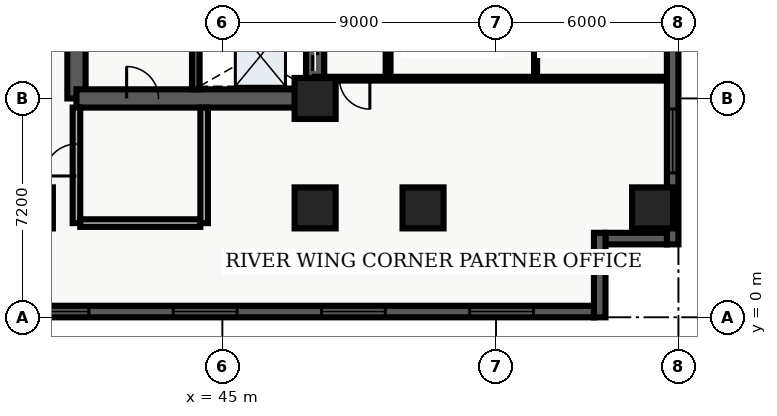
"""IFC4 building model, lengths in metres.
Left out: names, types, materials, properties, quantities, classifications, styles, units other than length and angle.
Written with IfcOpenShell. Run it as: python <this file> out.ifc"""

import sys

from ifc_helpers import new_model, entity, si_unit, converted_unit, direction, frame, origin_with_axes, origin_2d_with_axis, place, context, subcontext, project, spatial, polyline, rectangle, outline, extrude, element, fill, save


model = new_model("IFC4")
c1 = context("Model", 3, precision=1e-05, world=origin_with_axes(), true_north=direction((0.0, 1.0)))
c2 = subcontext(c1, "Body", "Model", "MODEL_VIEW")
j1 = project(units=[si_unit("LENGTHUNIT", "METRE"), converted_unit("PLANEANGLEUNIT", "DEGREE", entity("IfcPlaneAngleMeasure", 0.017), si_unit("PLANEANGLEUNIT", "RADIAN"), dimensions=[0, 0, 0, 0, 0, 0, 0])], contexts=[c1])
p1 = place(None, origin_with_axes())
s1 = spatial("IfcSite", under=j1, at=p1, CompositionType="ELEMENT")
p2 = place(p1, origin_with_axes())
s2 = spatial("IfcBuilding", under=s1, at=p2, CompositionType="ELEMENT")
p3 = place(p2, frame((0.0, 0.0, 67.8), z_axis=(0.0, 0.0, 1.0), x_axis=(1.0, 0.0, 0.0)))
s3 = spatial("IfcBuildingStorey", under=s2, at=p3, CompositionType="ELEMENT", Elevation=67.8)
p4 = place(p3, frame((40.2, 7.2, 0.0), z_axis=(0.0, 0.0, 1.0), x_axis=(0.0, 1.0, 0.0)))
e1 = element("IfcWall", 1, at=p4, inside=s3, PredefinedType="SHEAR", context=c2, shape_type="SweptSolid", body=[
    extrude(outline(polyline([(0.0, -0.3), (15.6, -0.3), (15.6, 0.3), (0.0, 0.3), (0.0, -0.3)])), origin_with_axes(), (0.0, 0.0, 1.0), 3.66),
])
p5 = place(p4, frame((12.75, 0.0, 0.0), z_axis=(0.0, 0.0, 1.0), x_axis=(1.0, 0.0, 0.0)))
e2 = element("IfcOpeningElement", 2, at=p5, cuts=e1, PredefinedType="OPENING", context=c2, shape_type="SweptSolid", body=[
    extrude(rectangle(XDim=1.2, YDim=0.62, at=origin_2d_with_axis()), origin_with_axes(), (0.0, 0.0, 1.0), 2.15),
])
p6 = place(p4, frame((9.3, 0.0, 0.0), z_axis=(0.0, 0.0, 1.0), x_axis=(1.0, 0.0, 0.0)))
e3 = element("IfcOpeningElement", 3, at=p6, cuts=e1, PredefinedType="OPENING", context=c2, shape_type="SweptSolid", body=[
    extrude(rectangle(XDim=0.9, YDim=0.62, at=origin_2d_with_axis()), origin_with_axes(), (0.0, 0.0, 1.0), 2.15),
])
p7 = place(p3, frame((40.2, 7.2, 0.0), z_axis=(0.0, 0.0, 1.0), x_axis=(1.0, 0.0, 0.0)))
e4 = element("IfcWall", 4, at=p7, inside=s3, PredefinedType="SHEAR", context=c2, shape_type="SweptSolid", body=[
    extrude(outline(polyline([(0.0, -0.3), (7.85, -0.3), (7.85, 0.3), (0.0, 0.3), (0.0, -0.3)])), origin_with_axes(), (0.0, 0.0, 1.0), 3.66),
])
p8 = place(p7, frame((2.175, 0.0, 0.0), z_axis=(0.0, 0.0, 1.0), x_axis=(1.0, 0.0, 0.0)))
e5 = element("IfcOpeningElement", 5, at=p8, cuts=e4, PredefinedType="OPENING", context=c2, shape_type="SweptSolid", body=[
    extrude(rectangle(XDim=1.05, YDim=0.62, at=origin_2d_with_axis()), origin_with_axes(), (0.0, 0.0, 1.0), 2.15),
])
p9 = place(p3, frame((48.05, 7.2, 0.0), z_axis=(0.0, 0.0, 1.0), x_axis=(0.0, 1.0, 0.0)))
e6 = element("IfcWall", 6, at=p9, inside=s3, PredefinedType="SHEAR", context=c2, shape_type="SweptSolid", body=[
    extrude(outline(polyline([(0.0, -0.3), (15.6, -0.3), (15.6, 0.3), (0.0, 0.3), (0.0, -0.3)])), origin_with_axes(), (0.0, 0.0, 1.0), 3.66),
])
p10 = place(p9, frame((1.425, 0.0, 0.0), z_axis=(0.0, 0.0, 1.0), x_axis=(1.0, 0.0, 0.0)))
e7 = element("IfcOpeningElement", 7, at=p10, cuts=e6, PredefinedType="OPENING", context=c2, shape_type="SweptSolid", body=[
    extrude(rectangle(XDim=1.05, YDim=0.62, at=origin_2d_with_axis()), origin_with_axes(), (0.0, 0.0, 1.0), 2.15),
])
p11 = place(p9, frame((3.475, 0.0, 0.0), z_axis=(0.0, 0.0, 1.0), x_axis=(1.0, 0.0, 0.0)))
e8 = element("IfcOpeningElement", 8, at=p11, cuts=e6, PredefinedType="OPENING", context=c2, shape_type="SweptSolid", body=[
    extrude(rectangle(XDim=1.05, YDim=0.62, at=origin_2d_with_axis()), origin_with_axes(), (0.0, 0.0, 1.0), 2.15),
])
p12 = place(p9, frame((5.625, 0.0, 0.0), z_axis=(0.0, 0.0, 1.0), x_axis=(1.0, 0.0, 0.0)))
e9 = element("IfcOpeningElement", 9, at=p12, cuts=e6, PredefinedType="OPENING", context=c2, shape_type="SweptSolid", body=[
    extrude(rectangle(XDim=0.95, YDim=0.62, at=origin_2d_with_axis()), origin_with_axes(), (0.0, 0.0, 1.0), 2.15),
])
p13 = place(p3, frame((44.125, 7.5, 0.0), z_axis=(0.0, 0.0, 1.0), x_axis=(0.0, 1.0, 0.0)))
e10 = element("IfcWall", 10, at=p13, inside=s3, PredefinedType="SHEAR", context=c2, shape_type="SweptSolid", body=[
    extrude(outline(polyline([(0.0, -0.125), (15.0, -0.125), (15.0, 0.125), (0.0, 0.125), (0.0, -0.125)])), origin_with_axes(), (0.0, 0.0, 1.0), 3.66),
])
p14 = place(p3, frame((40.2, 3.1, 0.0), z_axis=(0.0, 0.0, 1.0), x_axis=(0.0, 1.0, 0.0)))
e11 = element("IfcWall", 11, at=p14, inside=s3, PredefinedType="SOLIDWALL", context=c2, shape_type="SweptSolid", body=[
    extrude(outline(polyline([(0.0, -0.125), (3.8, -0.125), (3.8, 0.125), (0.0, 0.125), (0.0, -0.125)])), origin_with_axes(), (0.0, 0.0, 1.0), 2.7),
])
p15 = place(p14, frame((2.075, 0.0, 0.0), z_axis=(0.0, 0.0, 1.0), x_axis=(1.0, 0.0, 0.0)))
e12 = element("IfcOpeningElement", 12, at=p15, cuts=e11, PredefinedType="OPENING", context=c2, shape_type="SweptSolid", body=[
    extrude(rectangle(XDim=1.05, YDim=0.27, at=origin_2d_with_axis()), origin_with_axes(), (0.0, 0.0, 1.0), 2.15),
])
p16 = place(p3, frame((40.325, 3.1, 0.0), z_axis=(0.0, 0.0, 1.0), x_axis=(1.0, 0.0, 0.0)))
e13 = element("IfcWall", 13, at=p16, inside=s3, PredefinedType="SOLIDWALL", context=c2, shape_type="SweptSolid", body=[
    extrude(outline(polyline([(0.0, -0.125), (3.95, -0.125), (3.95, 0.125), (0.0, 0.125), (0.0, -0.125)])), origin_with_axes(), (0.0, 0.0, 1.0), 2.7),
])
p17 = place(p3, frame((44.4, 3.1, 0.0), z_axis=(0.0, 0.0, 1.0), x_axis=(0.0, 1.0, 0.0)))
e14 = element("IfcWall", 14, at=p17, inside=s3, PredefinedType="SOLIDWALL", context=c2, shape_type="SweptSolid", body=[
    extrude(outline(polyline([(0.0, -0.125), (3.8, -0.125), (3.8, 0.125), (0.0, 0.125), (0.0, -0.125)])), origin_with_axes(), (0.0, 0.0, 1.0), 2.7),
])
for number, where, z_axis, x_axis in (
    (15, (38.75, 3.6, 0.0), (0.0, 0.0, 1.0), (1.0, 0.0, 0.0)),
    (16, (48.05, 3.6, 0.0), (0.0, 0.0, 1.0), (1.0, 0.0, 0.0)),
    (17, (48.05, 7.2, 0.0), (0.0, 0.0, 1.0), (1.0, 0.0, 0.0)),
    (18, (51.6, 3.6, 0.0), (0.0, 0.0, 1.0), (1.0, 0.0, 0.0)),
    (19, (59.15, 3.6, 0.0), (0.0, 0.0, 1.0), (1.0, 0.0, 0.0)),
):
    element("IfcColumn", number, at=place(p3, frame(where, z_axis=z_axis, x_axis=x_axis)), inside=s3, PredefinedType="COLUMN", context=c2, shape_type="SweptSolid", body=[
        extrude(rectangle(XDim=1.35, YDim=1.35, at=origin_2d_with_axis()), origin_with_axes(), (0.0, 0.0, 1.0), 3.9),
    ])
p18 = place(p3, frame((50.45, 7.85, 0.0), z_axis=(0.0, 0.0, 1.0), x_axis=(0.0, 1.0, 0.0)))
e20 = element("IfcWall", 20, at=p18, inside=s3, PredefinedType="PARTITIONING", context=c2, shape_type="SweptSolid", body=[
    extrude(outline(polyline([(0.0, -0.08), (18.8, -0.08), (18.8, 0.08), (0.0, 0.08), (0.0, -0.08)])), origin_with_axes(), (0.0, 0.0, 1.0), 2.7),
])
p19 = place(p18, frame((4.405, 0.0, 0.0), z_axis=(0.0, 0.0, 1.0), x_axis=(1.0, 0.0, 0.0)))
e21 = element("IfcOpeningElement", 21, at=p19, cuts=e20, PredefinedType="OPENING", context=c2, shape_type="SweptSolid", body=[
    extrude(rectangle(XDim=1.0, YDim=0.18, at=origin_2d_with_axis()), origin_with_axes(), (0.0, 0.0, 1.0), 2.15),
])
p20 = place(p18, frame((13.465, 0.0, 0.0), z_axis=(0.0, 0.0, 1.0), x_axis=(1.0, 0.0, 0.0)))
e22 = element("IfcOpeningElement", 22, at=p20, cuts=e20, PredefinedType="OPENING", context=c2, shape_type="SweptSolid", body=[
    extrude(rectangle(XDim=1.0, YDim=0.18, at=origin_2d_with_axis()), origin_with_axes(), (0.0, 0.0, 1.0), 2.15),
])
p21 = place(p3, frame((59.64, 7.85, 0.0), z_axis=(0.0, 0.0, 1.0), x_axis=(-1.0, 0.0, 0.0)))
e23 = element("IfcWall", 23, at=p21, inside=s3, PredefinedType="PARTITIONING", context=c2, shape_type="SweptSolid", body=[
    extrude(outline(polyline([(0.0, -0.062), (11.59, -0.062), (11.59, 0.062), (0.0, 0.062), (0.0, -0.062)])), origin_with_axes(), (0.0, 0.0, 1.0), 2.7),
])
p22 = place(p21, frame((10.29, 0.0, 0.0), z_axis=(0.0, 0.0, 1.0), x_axis=(1.0, 0.0, 0.0)))
e24 = element("IfcOpeningElement", 24, at=p22, cuts=e23, PredefinedType="OPENING", context=c2, shape_type="SweptSolid", body=[
    extrude(rectangle(XDim=1.0, YDim=0.145, at=origin_2d_with_axis()), origin_with_axes(), (0.0, 0.0, 1.0), 2.15),
])
p23 = place(p3, frame((55.3, 7.98, 0.0), z_axis=(0.0, 0.0, 1.0), x_axis=(0.0, 1.0, 0.0)))
e25 = element("IfcWall", 25, at=p23, inside=s3, PredefinedType="PARTITIONING", context=c2, shape_type="SweptSolid", body=[
    extrude(outline(polyline([(0.0, -0.05), (18.54, -0.05), (18.54, 0.05), (0.0, 0.05), (0.0, -0.05)])), origin_with_axes(), (0.0, 0.0, 1.0), 2.7),
])
p24 = place(p23, frame((3.995, 0.0, 0.0), z_axis=(0.0, 0.0, 1.0), x_axis=(1.0, 0.0, 0.0)))
e26 = element("IfcOpeningElement", 26, at=p24, cuts=e25, PredefinedType="OPENING", context=c2, shape_type="SweptSolid", body=[
    extrude(rectangle(XDim=0.95, YDim=0.12, at=origin_2d_with_axis()), origin_with_axes(), (0.0, 0.0, 1.0), 2.15),
])
p25 = place(p23, frame((13.335, 0.0, 0.0), z_axis=(0.0, 0.0, 1.0), x_axis=(1.0, 0.0, 0.0)))
e27 = element("IfcOpeningElement", 27, at=p25, cuts=e25, PredefinedType="OPENING", context=c2, shape_type="SweptSolid", body=[
    extrude(rectangle(XDim=0.95, YDim=0.12, at=origin_2d_with_axis()), origin_with_axes(), (0.0, 0.0, 1.0), 2.15),
])
p26 = place(p3, frame((59.81, 26.02, 0.0), z_axis=(0.0, 0.0, 1.0), x_axis=(0.0, -1.0, 0.0)))
e28 = element("IfcWall", 28, at=p26, inside=s3, PredefinedType="SOLIDWALL", context=c2, shape_type="SweptSolid", body=[
    extrude(outline(polyline([(0.0, -0.19), (23.62, -0.19), (23.62, 0.19), (0.0, 0.19), (0.0, -0.19)])), origin_with_axes(), (0.0, 0.0, 1.0), 3.66),
])
p27 = place(p26, frame((3.853, 0.0, 0.45), z_axis=(0.0, 0.0, 1.0), x_axis=(1.0, 0.0, 0.0)))
e29 = element("IfcOpeningElement", 29, at=p27, cuts=e28, PredefinedType="OPENING", context=c2, shape_type="SweptSolid", body=[
    extrude(rectangle(XDim=2.1, YDim=0.4, at=origin_2d_with_axis()), origin_with_axes(), (0.0, 0.0, 1.0), 2.2),
])
p28 = place(p26, frame((20.218, 0.0, 0.45), z_axis=(0.0, 0.0, 1.0), x_axis=(1.0, 0.0, 0.0)))
e30 = element("IfcOpeningElement", 30, at=p28, cuts=e28, PredefinedType="OPENING", context=c2, shape_type="SweptSolid", body=[
    extrude(rectangle(XDim=2.1, YDim=0.4, at=origin_2d_with_axis()), origin_with_axes(), (0.0, 0.0, 1.0), 2.2),
])
p29 = place(p3, frame((59.62, 2.59, 0.0), z_axis=(0.0, 0.0, 1.0), x_axis=(-1.0, 0.0, 0.0)))
e31 = element("IfcWall", 31, at=p29, inside=s3, PredefinedType="SOLIDWALL", context=c2, shape_type="SweptSolid", body=[
    extrude(outline(polyline([(0.0, -0.19), (2.02, -0.19), (2.02, 0.19), (0.0, 0.19), (0.0, -0.19)])), origin_with_axes(), (0.0, 0.0, 1.0), 3.66),
])
p30 = place(p3, frame((57.41, 2.78, 0.0), z_axis=(0.0, 0.0, 1.0), x_axis=(0.0, -1.0, 0.0)))
e32 = element("IfcWall", 32, at=p30, inside=s3, PredefinedType="SOLIDWALL", context=c2, shape_type="SweptSolid", body=[
    extrude(outline(polyline([(0.0, -0.19), (2.78, -0.19), (2.78, 0.19), (0.0, 0.19), (0.0, -0.19)])), origin_with_axes(), (0.0, 0.0, 1.0), 3.66),
])
p31 = place(p3, frame((57.22, 0.19, 0.0), z_axis=(0.0, 0.0, 1.0), x_axis=(-1.0, 0.0, 0.0)))
e33 = element("IfcWall", 33, at=p31, inside=s3, PredefinedType="SOLIDWALL", context=c2, shape_type="SweptSolid", body=[
    extrude(outline(polyline([(0.0, -0.19), (54.82, -0.19), (54.82, 0.19), (0.0, 0.19), (0.0, -0.19)])), origin_with_axes(), (0.0, 0.0, 1.0), 3.66),
])
p32 = place(p31, frame((3.037, 0.0, 0.45), z_axis=(0.0, 0.0, 1.0), x_axis=(1.0, 0.0, 0.0)))
e34 = element("IfcOpeningElement", 34, at=p32, cuts=e33, PredefinedType="OPENING", context=c2, shape_type="SweptSolid", body=[
    extrude(rectangle(XDim=2.1, YDim=0.4, at=origin_2d_with_axis()), origin_with_axes(), (0.0, 0.0, 1.0), 2.2),
])
p33 = place(p31, frame((7.912, 0.0, 0.45), z_axis=(0.0, 0.0, 1.0), x_axis=(1.0, 0.0, 0.0)))
e35 = element("IfcOpeningElement", 35, at=p33, cuts=e33, PredefinedType="OPENING", context=c2, shape_type="SweptSolid", body=[
    extrude(rectangle(XDim=2.1, YDim=0.4, at=origin_2d_with_axis()), origin_with_axes(), (0.0, 0.0, 1.0), 2.2),
])
p34 = place(p31, frame((12.786, 0.0, 0.45), z_axis=(0.0, 0.0, 1.0), x_axis=(1.0, 0.0, 0.0)))
e36 = element("IfcOpeningElement", 36, at=p34, cuts=e33, PredefinedType="OPENING", context=c2, shape_type="SweptSolid", body=[
    extrude(rectangle(XDim=2.1, YDim=0.4, at=origin_2d_with_axis()), origin_with_axes(), (0.0, 0.0, 1.0), 2.2),
])
p35 = place(p31, frame((17.661, 0.0, 0.45), z_axis=(0.0, 0.0, 1.0), x_axis=(1.0, 0.0, 0.0)))
e37 = element("IfcOpeningElement", 37, at=p35, cuts=e33, PredefinedType="OPENING", context=c2, shape_type="SweptSolid", body=[
    extrude(rectangle(XDim=2.1, YDim=0.4, at=origin_2d_with_axis()), origin_with_axes(), (0.0, 0.0, 1.0), 2.2),
])
p36 = place(p31, frame((22.535, 0.0, 0.45), z_axis=(0.0, 0.0, 1.0), x_axis=(1.0, 0.0, 0.0)))
e38 = element("IfcOpeningElement", 38, at=p36, cuts=e33, PredefinedType="OPENING", context=c2, shape_type="SweptSolid", body=[
    extrude(rectangle(XDim=2.1, YDim=0.4, at=origin_2d_with_axis()), origin_with_axes(), (0.0, 0.0, 1.0), 2.2),
])
p37 = place(p31, frame((27.41, 0.0, 0.45), z_axis=(0.0, 0.0, 1.0), x_axis=(1.0, 0.0, 0.0)))
e39 = element("IfcOpeningElement", 39, at=p37, cuts=e33, PredefinedType="OPENING", context=c2, shape_type="SweptSolid", body=[
    extrude(rectangle(XDim=2.1, YDim=0.4, at=origin_2d_with_axis()), origin_with_axes(), (0.0, 0.0, 1.0), 2.2),
])
p38 = place(p31, frame((32.285, 0.0, 0.45), z_axis=(0.0, 0.0, 1.0), x_axis=(1.0, 0.0, 0.0)))
e40 = element("IfcOpeningElement", 40, at=p38, cuts=e33, PredefinedType="OPENING", context=c2, shape_type="SweptSolid", body=[
    extrude(rectangle(XDim=2.1, YDim=0.4, at=origin_2d_with_axis()), origin_with_axes(), (0.0, 0.0, 1.0), 2.2),
])
p39 = place(p31, frame((37.159, 0.0, 0.45), z_axis=(0.0, 0.0, 1.0), x_axis=(1.0, 0.0, 0.0)))
e41 = element("IfcOpeningElement", 41, at=p39, cuts=e33, PredefinedType="OPENING", context=c2, shape_type="SweptSolid", body=[
    extrude(rectangle(XDim=2.1, YDim=0.4, at=origin_2d_with_axis()), origin_with_axes(), (0.0, 0.0, 1.0), 2.2),
])
p40 = place(p31, frame((42.034, 0.0, 0.45), z_axis=(0.0, 0.0, 1.0), x_axis=(1.0, 0.0, 0.0)))
e42 = element("IfcOpeningElement", 42, at=p40, cuts=e33, PredefinedType="OPENING", context=c2, shape_type="SweptSolid", body=[
    extrude(rectangle(XDim=2.1, YDim=0.4, at=origin_2d_with_axis()), origin_with_axes(), (0.0, 0.0, 1.0), 2.2),
])
p41 = place(p31, frame((47.758, 0.0, 0.45), z_axis=(0.0, 0.0, 1.0), x_axis=(1.0, 0.0, 0.0)))
e43 = element("IfcOpeningElement", 43, at=p41, cuts=e33, PredefinedType="OPENING", context=c2, shape_type="SweptSolid", body=[
    extrude(rectangle(XDim=2.1, YDim=0.4, at=origin_2d_with_axis()), origin_with_axes(), (0.0, 0.0, 1.0), 2.2),
])
p42 = place(p31, frame((52.233, 0.0, 0.45), z_axis=(0.0, 0.0, 1.0), x_axis=(1.0, 0.0, 0.0)))
e44 = element("IfcOpeningElement", 44, at=p42, cuts=e33, PredefinedType="OPENING", context=c2, shape_type="SweptSolid", body=[
    extrude(rectangle(XDim=2.1, YDim=0.4, at=origin_2d_with_axis()), origin_with_axes(), (0.0, 0.0, 1.0), 2.2),
])
p43 = place(p9, frame((1.425, 0.0, 0.0), z_axis=(0.0, 0.0, 1.0), x_axis=(1.0, 0.0, 0.0)))
e45 = element("IfcDoor", 45, at=p43, inside=s3, OperationType="SLIDING_TO_LEFT", PredefinedType="DOOR", context=c2, shape_type="SweptSolid", body=[
    extrude(rectangle(XDim=1.05, YDim=0.09, at=origin_2d_with_axis()), origin_with_axes(), (0.0, 0.0, 1.0), 2.15),
])
fill(e7, e45)
p44 = place(p7, frame((2.175, 0.0, 0.0), z_axis=(0.0, 0.0, 1.0), x_axis=(1.0, 0.0, 0.0)))
e46 = element("IfcDoor", 46, at=p44, inside=s3, OperationType="SINGLE_SWING_LEFT", PredefinedType="DOOR", context=c2, shape_type="SweptSolid", body=[
    extrude(rectangle(XDim=1.05, YDim=0.09, at=origin_2d_with_axis()), origin_with_axes(), (0.0, 0.0, 1.0), 2.15),
])
fill(e5, e46)
p45 = place(p14, frame((2.075, 0.0, 0.0), z_axis=(0.0, 0.0, 1.0), x_axis=(1.0, 0.0, 0.0)))
e47 = element("IfcDoor", 47, at=p45, inside=s3, OperationType="SINGLE_SWING_LEFT", PredefinedType="DOOR", context=c2, shape_type="SweptSolid", body=[
    extrude(rectangle(XDim=1.05, YDim=0.09, at=origin_2d_with_axis()), origin_with_axes(), (0.0, 0.0, 1.0), 2.15),
])
fill(e12, e47)
p46 = place(p21, frame((10.29, 0.0, 0.0), z_axis=(0.0, 0.0, 1.0), x_axis=(1.0, 0.0, 0.0)))
e48 = element("IfcDoor", 48, at=p46, inside=s3, OperationType="SINGLE_SWING_LEFT", PredefinedType="DOOR", context=c2, shape_type="SweptSolid", body=[
    extrude(rectangle(XDim=1.0, YDim=0.075, at=origin_2d_with_axis()), origin_with_axes(), (0.0, 0.0, 1.0), 2.15),
])
fill(e24, e48)
p47 = place(p26, frame((20.218, 0.0, 0.45), z_axis=(0.0, 0.0, 1.0), x_axis=(1.0, 0.0, 0.0)))
e49 = element("IfcWindow", 49, at=p47, inside=s3, PredefinedType="WINDOW", context=c2, shape_type="SweptSolid", body=[
    extrude(rectangle(XDim=2.1, YDim=0.09, at=origin_2d_with_axis()), origin_with_axes(), (0.0, 0.0, 1.0), 2.2),
])
fill(e30, e49)
p48 = place(p31, frame((3.037, 0.0, 0.45), z_axis=(0.0, 0.0, 1.0), x_axis=(1.0, 0.0, 0.0)))
e50 = element("IfcWindow", 50, at=p48, inside=s3, PredefinedType="WINDOW", context=c2, shape_type="SweptSolid", body=[
    extrude(rectangle(XDim=2.1, YDim=0.09, at=origin_2d_with_axis()), origin_with_axes(), (0.0, 0.0, 1.0), 2.2),
])
fill(e34, e50)
p49 = place(p31, frame((7.912, 0.0, 0.45), z_axis=(0.0, 0.0, 1.0), x_axis=(1.0, 0.0, 0.0)))
e51 = element("IfcWindow", 51, at=p49, inside=s3, PredefinedType="WINDOW", context=c2, shape_type="SweptSolid", body=[
    extrude(rectangle(XDim=2.1, YDim=0.09, at=origin_2d_with_axis()), origin_with_axes(), (0.0, 0.0, 1.0), 2.2),
])
fill(e35, e51)
p50 = place(p31, frame((12.786, 0.0, 0.45), z_axis=(0.0, 0.0, 1.0), x_axis=(1.0, 0.0, 0.0)))
e52 = element("IfcWindow", 52, at=p50, inside=s3, PredefinedType="WINDOW", context=c2, shape_type="SweptSolid", body=[
    extrude(rectangle(XDim=2.1, YDim=0.09, at=origin_2d_with_axis()), origin_with_axes(), (0.0, 0.0, 1.0), 2.2),
])
fill(e36, e52)
p51 = place(p31, frame((17.661, 0.0, 0.45), z_axis=(0.0, 0.0, 1.0), x_axis=(1.0, 0.0, 0.0)))
e53 = element("IfcWindow", 53, at=p51, inside=s3, PredefinedType="WINDOW", context=c2, shape_type="SweptSolid", body=[
    extrude(rectangle(XDim=2.1, YDim=0.09, at=origin_2d_with_axis()), origin_with_axes(), (0.0, 0.0, 1.0), 2.2),
])
fill(e37, e53)
save(model, sys.argv[1])
